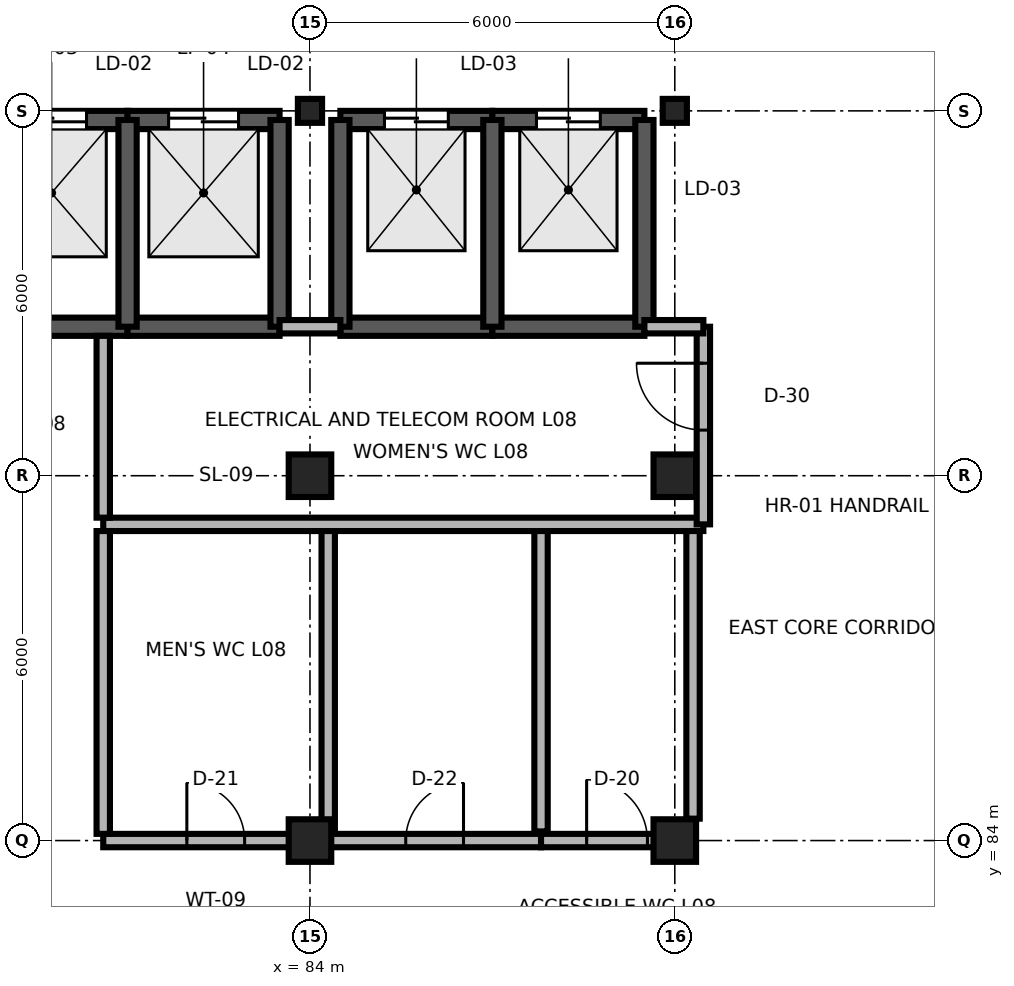
"""IFC4 building model, lengths in metres.
Left out: names, types, materials, properties, quantities, classifications, styles, units other than length and angle.
Written with IfcOpenShell. Run it as: python <this file> out.ifc"""

import sys

from ifc_helpers import new_model, si_unit, direction, frame, frame_2d, origin, origin_2d, place, context, subcontext, project, spatial, rectangle, i_section, extrude, element, fill, save


model = new_model("IFC4")
c1 = context("Model", 3, precision=1e-05, world=origin(), true_north=direction((0.0, 1.0)))
c2 = subcontext(c1, "Body", "Model", "MODEL_VIEW")
j1 = project(units=[si_unit("LENGTHUNIT", "METRE"), si_unit("PLANEANGLEUNIT", "RADIAN")], contexts=[c1])
p1 = place(None, origin())
s1 = spatial("IfcSite", under=j1, at=p1, CompositionType="ELEMENT")
p2 = place(p1, origin())
s2 = spatial("IfcBuilding", under=s1, at=p2, CompositionType="ELEMENT")
p3 = place(p2, frame((0.0, 0.0, 32.7)))
s3 = spatial("IfcBuildingStorey", under=s2, at=p3, CompositionType="ELEMENT", Elevation=32.7)
for number, where, z_axis, x_axis in (
    (1, (84.0, 84.0, 0.0), (0.0, 0.0, 1.0), (1.0, 0.0, 0.0)),
    (2, (90.0, 84.0, 0.0), (0.0, 0.0, 1.0), (1.0, 0.0, 0.0)),
    (3, (84.0, 90.0, 0.0), (0.0, 0.0, 1.0), (1.0, 0.0, 0.0)),
    (4, (90.0, 90.0, 0.0), (0.0, 0.0, 1.0), (1.0, 0.0, 0.0)),
):
    element("IfcColumn", number, at=place(p3, frame(where, z_axis=z_axis, x_axis=x_axis)), inside=s3, PredefinedType="COLUMN", context=c2, shape_type="SweptSolid", body=[
        extrude(rectangle(XDim=0.7, YDim=0.7, at=origin_2d()), origin(), (0.0, 0.0, 1.0), 3.9),
    ])
for number, where, z_axis, x_axis in (
    (5, (84.0, 96.0, 0.0), (0.0, 0.0, 1.0), (1.0, 0.0, 0.0)),
    (6, (90.0, 96.0, 0.0), (0.0, 0.0, 1.0), (1.0, 0.0, 0.0)),
):
    element("IfcColumn", number, at=place(p3, frame(where, z_axis=z_axis, x_axis=x_axis)), inside=s3, PredefinedType="COLUMN", context=c2, shape_type="SweptSolid", body=[
        extrude(i_section(OverallWidth=0.398, OverallDepth=0.394, WebThickness=0.011, FlangeThickness=0.018, FilletRadius=0.022, at=origin_2d()), origin(), (0.0, 0.0, 1.0), 3.9),
    ])
p4 = place(p3, frame((78.5, 95.85, 0.0), z_axis=(0.0, 0.0, 1.0), x_axis=(1.0, 0.0, 0.0)))
e7 = element("IfcWall", 7, at=p4, inside=s3, PredefinedType="SHEAR", context=c2, shape_type="SweptSolid", body=[
    extrude(rectangle(XDim=2.5, YDim=0.3, at=frame_2d((1.25, 0.0))), origin(), (0.0, 0.0, 1.0), 3.74),
])
p5 = place(p4, frame((0.675, 0.0, 0.0)))
e8 = element("IfcOpeningElement", 8, at=p5, cuts=e7, PredefinedType="OPENING", context=c2, shape_type="SweptSolid", body=[
    extrude(rectangle(XDim=1.15, YDim=2.15, at=frame_2d((0.575, 1.075))), frame((0.0, 0.165, 0.0), z_axis=(0.0, -1.0, 0.0), x_axis=(1.0, 0.0, 0.0)), (0.0, 0.0, 1.0), 0.33),
])
p6 = place(p3, frame((78.5, 92.45, 0.0), z_axis=(0.0, 0.0, 1.0), x_axis=(1.0, 0.0, 0.0)))
e9 = element("IfcWall", 9, at=p6, inside=s3, PredefinedType="SHEAR", context=c2, shape_type="SweptSolid", body=[
    extrude(rectangle(XDim=2.5, YDim=0.3, at=frame_2d((1.25, 0.0))), origin(), (0.0, 0.0, 1.0), 3.74),
])
p7 = place(p3, frame((81.0, 95.85, 0.0), z_axis=(0.0, 0.0, 1.0), x_axis=(1.0, 0.0, 0.0)))
e10 = element("IfcWall", 10, at=p7, inside=s3, PredefinedType="SHEAR", context=c2, shape_type="SweptSolid", body=[
    extrude(rectangle(XDim=2.5, YDim=0.3, at=frame_2d((1.25, 0.0))), origin(), (0.0, 0.0, 1.0), 3.74),
])
p8 = place(p7, frame((0.675, 0.0, 0.0)))
e11 = element("IfcOpeningElement", 11, at=p8, cuts=e10, PredefinedType="OPENING", context=c2, shape_type="SweptSolid", body=[
    extrude(rectangle(XDim=1.15, YDim=2.15, at=frame_2d((0.575, 1.075))), frame((0.0, 0.165, 0.0), z_axis=(0.0, -1.0, 0.0), x_axis=(1.0, 0.0, 0.0)), (0.0, 0.0, 1.0), 0.33),
])
p9 = place(p3, frame((81.0, 92.45, 0.0), z_axis=(0.0, 0.0, 1.0), x_axis=(1.0, 0.0, 0.0)))
e12 = element("IfcWall", 12, at=p9, inside=s3, PredefinedType="SHEAR", context=c2, shape_type="SweptSolid", body=[
    extrude(rectangle(XDim=2.5, YDim=0.3, at=frame_2d((1.25, 0.0))), origin(), (0.0, 0.0, 1.0), 3.74),
])
for number, where, z_axis, x_axis in (
    (13, (81.0, 92.45, 0.0), (0.0, 0.0, 1.0), (0.0, 1.0, 0.0)),
    (14, (83.5, 92.45, 0.0), (0.0, 0.0, 1.0), (0.0, 1.0, 0.0)),
):
    element("IfcWall", number, at=place(p3, frame(where, z_axis=z_axis, x_axis=x_axis)), inside=s3, PredefinedType="SHEAR", context=c2, shape_type="SweptSolid", body=[
        extrude(rectangle(XDim=3.4, YDim=0.3, at=frame_2d((1.7, 0.0))), origin(), (0.0, 0.0, 1.0), 3.74),
    ])
p10 = place(p3, frame((84.5, 95.85, 0.0), z_axis=(0.0, 0.0, 1.0), x_axis=(1.0, 0.0, 0.0)))
e15 = element("IfcWall", 15, at=p10, inside=s3, PredefinedType="SHEAR", context=c2, shape_type="SweptSolid", body=[
    extrude(rectangle(XDim=2.5, YDim=0.3, at=frame_2d((1.25, 0.0))), origin(), (0.0, 0.0, 1.0), 3.74),
])
p11 = place(p10, frame((0.725, 0.0, 0.0)))
e16 = element("IfcOpeningElement", 16, at=p11, cuts=e15, PredefinedType="OPENING", context=c2, shape_type="SweptSolid", body=[
    extrude(rectangle(XDim=1.05, YDim=2.1, at=frame_2d((0.525, 1.05))), frame((0.0, 0.165, 0.0), z_axis=(0.0, -1.0, 0.0), x_axis=(1.0, 0.0, 0.0)), (0.0, 0.0, 1.0), 0.33),
])
p12 = place(p3, frame((84.5, 92.45, 0.0), z_axis=(0.0, 0.0, 1.0), x_axis=(1.0, 0.0, 0.0)))
e17 = element("IfcWall", 17, at=p12, inside=s3, PredefinedType="SHEAR", context=c2, shape_type="SweptSolid", body=[
    extrude(rectangle(XDim=2.5, YDim=0.3, at=frame_2d((1.25, 0.0))), origin(), (0.0, 0.0, 1.0), 3.74),
])
p13 = place(p3, frame((84.5, 92.45, 0.0), z_axis=(0.0, 0.0, 1.0), x_axis=(0.0, 1.0, 0.0)))
e18 = element("IfcWall", 18, at=p13, inside=s3, PredefinedType="SHEAR", context=c2, shape_type="SweptSolid", body=[
    extrude(rectangle(XDim=3.4, YDim=0.3, at=frame_2d((1.7, 0.0))), origin(), (0.0, 0.0, 1.0), 3.74),
])
p14 = place(p3, frame((87.0, 95.85, 0.0), z_axis=(0.0, 0.0, 1.0), x_axis=(1.0, 0.0, 0.0)))
e19 = element("IfcWall", 19, at=p14, inside=s3, PredefinedType="SHEAR", context=c2, shape_type="SweptSolid", body=[
    extrude(rectangle(XDim=2.5, YDim=0.3, at=frame_2d((1.25, 0.0))), origin(), (0.0, 0.0, 1.0), 3.74),
])
p15 = place(p14, frame((0.725, 0.0, 0.0)))
e20 = element("IfcOpeningElement", 20, at=p15, cuts=e19, PredefinedType="OPENING", context=c2, shape_type="SweptSolid", body=[
    extrude(rectangle(XDim=1.05, YDim=2.1, at=frame_2d((0.525, 1.05))), frame((0.0, 0.165, 0.0), z_axis=(0.0, -1.0, 0.0), x_axis=(1.0, 0.0, 0.0)), (0.0, 0.0, 1.0), 0.33),
])
p16 = place(p3, frame((87.0, 92.45, 0.0), z_axis=(0.0, 0.0, 1.0), x_axis=(1.0, 0.0, 0.0)))
e21 = element("IfcWall", 21, at=p16, inside=s3, PredefinedType="SHEAR", context=c2, shape_type="SweptSolid", body=[
    extrude(rectangle(XDim=2.5, YDim=0.3, at=frame_2d((1.25, 0.0))), origin(), (0.0, 0.0, 1.0), 3.74),
])
for number, where, z_axis, x_axis in (
    (22, (87.0, 92.45, 0.0), (0.0, 0.0, 1.0), (0.0, 1.0, 0.0)),
    (23, (89.5, 92.45, 0.0), (0.0, 0.0, 1.0), (0.0, 1.0, 0.0)),
):
    element("IfcWall", number, at=place(p3, frame(where, z_axis=z_axis, x_axis=x_axis)), inside=s3, PredefinedType="SHEAR", context=c2, shape_type="SweptSolid", body=[
        extrude(rectangle(XDim=3.4, YDim=0.3, at=frame_2d((1.7, 0.0))), origin(), (0.0, 0.0, 1.0), 3.74),
    ])
p17 = place(p3, frame((80.6, 84.0, 0.0), z_axis=(0.0, 0.0, 1.0), x_axis=(1.0, 0.0, 0.0)))
e24 = element("IfcWall", 24, at=p17, inside=s3, PredefinedType="PARTITIONING", context=c2, shape_type="SweptSolid", body=[
    extrude(rectangle(XDim=3.7, YDim=0.22, at=frame_2d((1.85, 0.0))), origin(), (0.0, 0.0, 1.0), 3.012),
])
p18 = place(p17, frame((1.375, 0.0, 0.0)))
e25 = element("IfcOpeningElement", 25, at=p18, cuts=e24, PredefinedType="OPENING", context=c2, shape_type="SweptSolid", body=[
    extrude(rectangle(XDim=0.95, YDim=2.15, at=frame_2d((0.475, 1.075))), frame((0.0, 0.125, 0.0), z_axis=(0.0, -1.0, 0.0), x_axis=(1.0, 0.0, 0.0)), (0.0, 0.0, 1.0), 0.25),
])
p19 = place(p3, frame((84.3, 84.0, 0.0), z_axis=(0.0, 0.0, 1.0), x_axis=(1.0, 0.0, 0.0)))
e26 = element("IfcWall", 26, at=p19, inside=s3, PredefinedType="PARTITIONING", context=c2, shape_type="SweptSolid", body=[
    extrude(rectangle(XDim=3.5, YDim=0.22, at=frame_2d((1.75, 0.0))), origin(), (0.0, 0.0, 1.0), 3.012),
])
p20 = place(p19, frame((1.275, 0.0, 0.0)))
e27 = element("IfcOpeningElement", 27, at=p20, cuts=e26, PredefinedType="OPENING", context=c2, shape_type="SweptSolid", body=[
    extrude(rectangle(XDim=0.95, YDim=2.1, at=frame_2d((0.475, 1.05))), frame((0.0, 0.125, 0.0), z_axis=(0.0, -1.0, 0.0), x_axis=(1.0, 0.0, 0.0)), (0.0, 0.0, 1.0), 0.25),
])
p21 = place(p3, frame((87.8, 84.0, 0.0), z_axis=(0.0, 0.0, 1.0), x_axis=(1.0, 0.0, 0.0)))
e28 = element("IfcWall", 28, at=p21, inside=s3, PredefinedType="PARTITIONING", context=c2, shape_type="SweptSolid", body=[
    extrude(rectangle(XDim=2.5, YDim=0.22, at=frame_2d((1.25, 0.0))), origin(), (0.0, 0.0, 1.0), 3.012),
])
p22 = place(p21, frame((0.75, 0.0, 0.0)))
e29 = element("IfcOpeningElement", 29, at=p22, cuts=e28, PredefinedType="OPENING", context=c2, shape_type="SweptSolid", body=[
    extrude(rectangle(XDim=1.0, YDim=2.15, at=frame_2d((0.5, 1.075))), frame((0.0, 0.125, 0.0), z_axis=(0.0, -1.0, 0.0), x_axis=(1.0, 0.0, 0.0)), (0.0, 0.0, 1.0), 0.25),
])
for number, where, z_axis, x_axis in (
    (30, (84.3, 84.15, 0.0), (0.0, 0.0, 1.0), (0.0, 1.0, 0.0)),
    (31, (87.8, 84.15, 0.0), (0.0, 0.0, 1.0), (0.0, 1.0, 0.0)),
):
    element("IfcWall", number, at=place(p3, frame(where, z_axis=z_axis, x_axis=x_axis)), inside=s3, PredefinedType="PARTITIONING", context=c2, shape_type="SweptSolid", body=[
        extrude(rectangle(XDim=5.0, YDim=0.22, at=frame_2d((2.5, 0.0))), origin(), (0.0, 0.0, 1.0), 3.4),
    ])
p23 = place(p3, frame((80.6, 89.2, 0.0), z_axis=(0.0, 0.0, 1.0), x_axis=(1.0, 0.0, 0.0)))
e32 = element("IfcWall", 32, at=p23, inside=s3, PredefinedType="PARTITIONING", context=c2, shape_type="SweptSolid", body=[
    extrude(rectangle(XDim=9.87, YDim=0.22, at=frame_2d((4.935, 0.0))), origin(), (0.0, 0.0, 1.0), 3.4),
])
p24 = place(p3, frame((90.47, 89.2, 0.0), z_axis=(0.0, 0.0, 1.0), x_axis=(0.0, 1.0, 0.0)))
e33 = element("IfcWall", 33, at=p24, inside=s3, PredefinedType="PARTITIONING", context=c2, shape_type="SweptSolid", body=[
    extrude(rectangle(XDim=3.25, YDim=0.22, at=frame_2d((1.625, 0.0))), origin(), (0.0, 0.0, 1.0), 3.4),
])
p25 = place(p24, frame((1.55, 0.0, 0.0)))
e34 = element("IfcOpeningElement", 34, at=p25, cuts=e33, PredefinedType="OPENING", context=c2, shape_type="SweptSolid", body=[
    extrude(rectangle(XDim=1.1, YDim=2.15, at=frame_2d((0.55, 1.075))), frame((0.0, 0.125, 0.0), z_axis=(0.0, -1.0, 0.0), x_axis=(1.0, 0.0, 0.0)), (0.0, 0.0, 1.0), 0.25),
])
p26 = place(p3, frame((80.6, 84.11, 0.0), z_axis=(0.0, 0.0, 1.0), x_axis=(0.0, 1.0, 0.0)))
e35 = element("IfcWall", 35, at=p26, inside=s3, PredefinedType="PARTITIONING", context=c2, shape_type="SweptSolid", body=[
    extrude(rectangle(XDim=4.98, YDim=0.22, at=frame_2d((2.49, 0.0))), origin(), (0.0, 0.0, 1.0), 3.4),
])
p27 = place(p3, frame((90.3, 84.36, 0.0), z_axis=(0.0, 0.0, 1.0), x_axis=(0.0, 1.0, 0.0)))
e36 = element("IfcWall", 36, at=p27, inside=s3, PredefinedType="PARTITIONING", context=c2, shape_type="SweptSolid", body=[
    extrude(rectangle(XDim=4.73, YDim=0.22, at=frame_2d((2.365, 0.0))), origin(), (0.0, 0.0, 1.0), 3.4),
])
p28 = place(p3, frame((80.6, 89.31, 0.0), z_axis=(0.0, 0.0, 1.0), x_axis=(0.0, 1.0, 0.0)))
e37 = element("IfcWall", 37, at=p28, inside=s3, PredefinedType="PARTITIONING", context=c2, shape_type="SweptSolid", body=[
    extrude(rectangle(XDim=2.99, YDim=0.22, at=frame_2d((1.495, 0.0))), origin(), (0.0, 0.0, 1.0), 3.4),
])
p29 = place(p3, frame((83.5, 92.45, 0.0), z_axis=(0.0, 0.0, 1.0), x_axis=(1.0, 0.0, 0.0)))
e38 = element("IfcWall", 38, at=p29, inside=s3, PredefinedType="PARTITIONING", context=c2, shape_type="SweptSolid", body=[
    extrude(rectangle(XDim=1.0, YDim=0.22, at=frame_2d((0.5, 0.0))), origin(), (0.0, 0.0, 1.0), 3.4),
])
p30 = place(p3, frame((89.5, 92.45, 0.0), z_axis=(0.0, 0.0, 1.0), x_axis=(1.0, 0.0, 0.0)))
e39 = element("IfcWall", 39, at=p30, inside=s3, PredefinedType="PARTITIONING", context=c2, shape_type="SweptSolid", body=[
    extrude(rectangle(XDim=0.97, YDim=0.22, at=frame_2d((0.485, 0.0))), origin(), (0.0, 0.0, 1.0), 3.4),
])
p31 = place(p5, origin())
e40 = element("IfcDoor", 40, at=p31, inside=s3, OperationType="DOUBLE_DOOR_SLIDING", PredefinedType="DOOR", context=c2, shape_type="SweptSolid", body=[
    extrude(rectangle(XDim=1.15, YDim=2.15, at=frame_2d((0.575, 1.075))), frame((0.0, 0.025, 0.0), z_axis=(0.0, -1.0, 0.0), x_axis=(1.0, 0.0, 0.0)), (0.0, 0.0, 1.0), 0.05),
])
fill(e8, e40)
p32 = place(p8, origin())
e41 = element("IfcDoor", 41, at=p32, inside=s3, OperationType="DOUBLE_DOOR_SLIDING", PredefinedType="DOOR", context=c2, shape_type="SweptSolid", body=[
    extrude(rectangle(XDim=1.15, YDim=2.15, at=frame_2d((0.575, 1.075))), frame((0.0, 0.025, 0.0), z_axis=(0.0, -1.0, 0.0), x_axis=(1.0, 0.0, 0.0)), (0.0, 0.0, 1.0), 0.05),
])
fill(e11, e41)
p33 = place(p11, origin())
e42 = element("IfcDoor", 42, at=p33, inside=s3, OperationType="DOUBLE_DOOR_SLIDING", PredefinedType="DOOR", context=c2, shape_type="SweptSolid", body=[
    extrude(rectangle(XDim=1.05, YDim=2.1, at=frame_2d((0.525, 1.05))), frame((0.0, 0.025, 0.0), z_axis=(0.0, -1.0, 0.0), x_axis=(1.0, 0.0, 0.0)), (0.0, 0.0, 1.0), 0.05),
])
fill(e16, e42)
p34 = place(p15, origin())
e43 = element("IfcDoor", 43, at=p34, inside=s3, OperationType="DOUBLE_DOOR_SLIDING", PredefinedType="DOOR", context=c2, shape_type="SweptSolid", body=[
    extrude(rectangle(XDim=1.05, YDim=2.1, at=frame_2d((0.525, 1.05))), frame((0.0, 0.025, 0.0), z_axis=(0.0, -1.0, 0.0), x_axis=(1.0, 0.0, 0.0)), (0.0, 0.0, 1.0), 0.05),
])
fill(e20, e43)
p35 = place(p18, origin())
e44 = element("IfcDoor", 44, at=p35, inside=s3, OperationType="SINGLE_SWING_LEFT", PredefinedType="DOOR", context=c2, shape_type="SweptSolid", body=[
    extrude(rectangle(XDim=0.95, YDim=2.15, at=frame_2d((0.475, 1.075))), frame((0.0, 0.025, 0.0), z_axis=(0.0, -1.0, 0.0), x_axis=(1.0, 0.0, 0.0)), (0.0, 0.0, 1.0), 0.05),
])
fill(e25, e44)
p36 = place(p20, origin())
e45 = element("IfcDoor", 45, at=p36, inside=s3, OperationType="SINGLE_SWING_RIGHT", PredefinedType="DOOR", context=c2, shape_type="SweptSolid", body=[
    extrude(rectangle(XDim=0.95, YDim=2.1, at=frame_2d((0.475, 1.05))), frame((0.0, 0.025, 0.0), z_axis=(0.0, -1.0, 0.0), x_axis=(1.0, 0.0, 0.0)), (0.0, 0.0, 1.0), 0.05),
])
fill(e27, e45)
p37 = place(p22, origin())
e46 = element("IfcDoor", 46, at=p37, inside=s3, OperationType="SINGLE_SWING_LEFT", PredefinedType="DOOR", context=c2, shape_type="SweptSolid", body=[
    extrude(rectangle(XDim=1.0, YDim=2.15, at=frame_2d((0.5, 1.075))), frame((0.0, 0.025, 0.0), z_axis=(0.0, -1.0, 0.0), x_axis=(1.0, 0.0, 0.0)), (0.0, 0.0, 1.0), 0.05),
])
fill(e29, e46)
p38 = place(p25, origin())
e47 = element("IfcDoor", 47, at=p38, inside=s3, OperationType="SINGLE_SWING_RIGHT", PredefinedType="DOOR", context=c2, shape_type="SweptSolid", body=[
    extrude(rectangle(XDim=1.1, YDim=2.15, at=frame_2d((0.55, 1.075))), frame((0.0, 0.025, 0.0), z_axis=(0.0, -1.0, 0.0), x_axis=(1.0, 0.0, 0.0)), (0.0, 0.0, 1.0), 0.05),
])
fill(e34, e47)
save(model, sys.argv[1])
